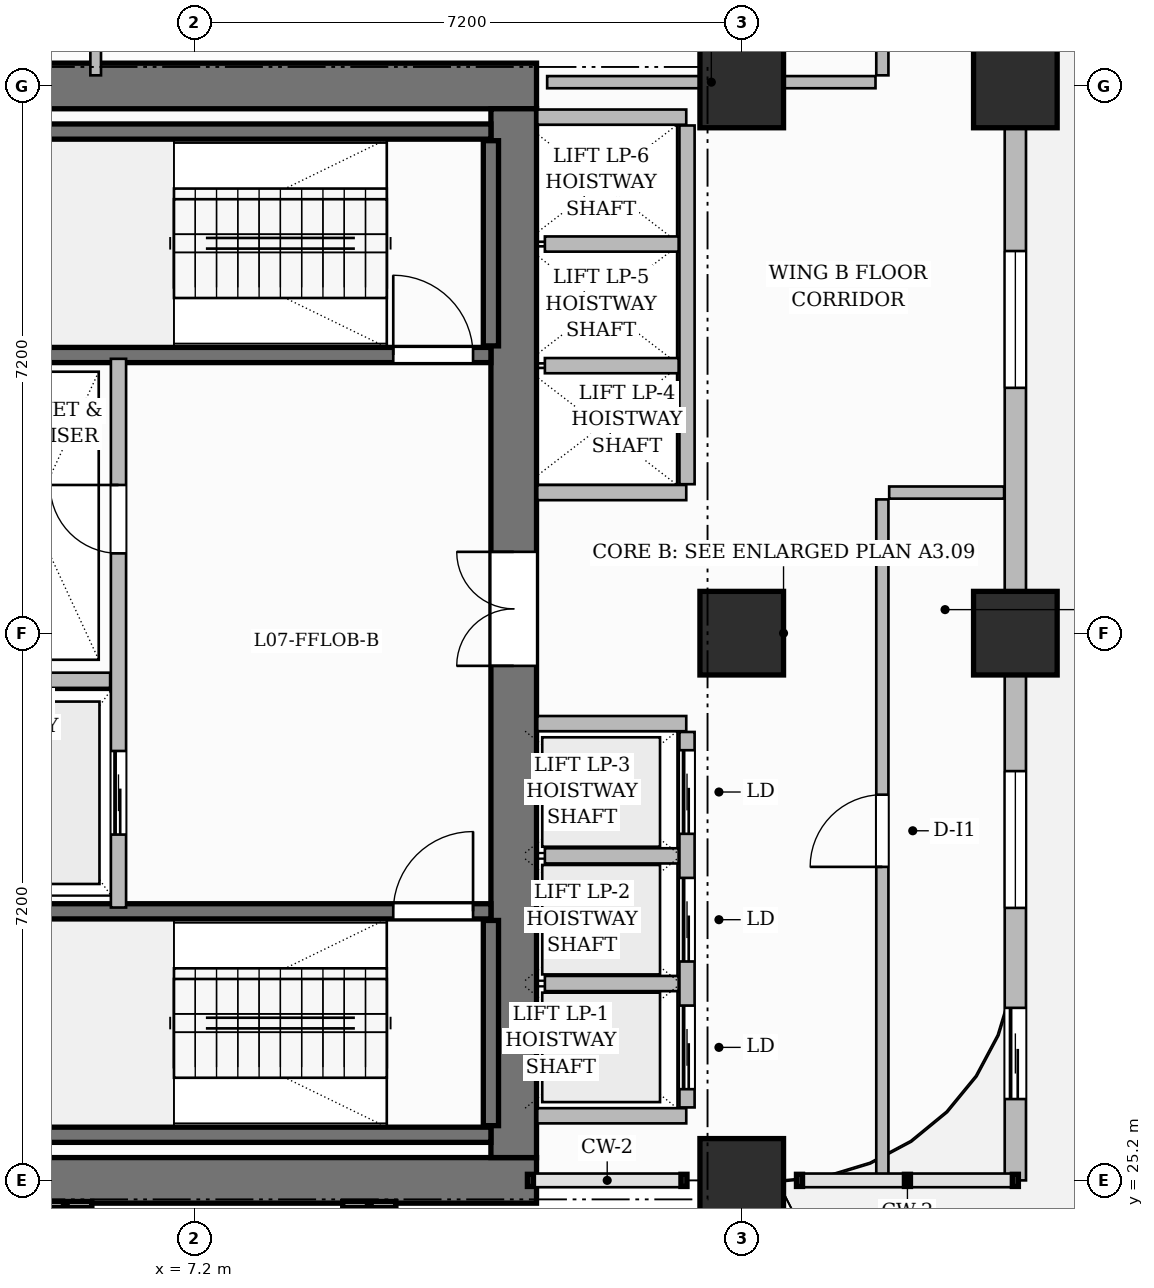
"""IFC4 building model, lengths in metres.
Left out: names, types, materials, properties, quantities, classifications, styles, units other than length and angle.
Written with IfcOpenShell. Run it as: python <this file> out.ifc"""

import sys

from ifc_helpers import new_model, si_unit, direction, frame, frame_2d, origin, origin_2d, place, context, subcontext, project, spatial, rectangle, extrude, source, transform, mapped, element, fill, save


model = new_model("IFC4")
c1 = context("Model", 3, precision=1e-05, world=origin(), true_north=direction((0.0, 1.0)))
c2 = subcontext(c1, "Body", "Model", "MODEL_VIEW")
j1 = project(units=[si_unit("LENGTHUNIT", "METRE"), si_unit("PLANEANGLEUNIT", "RADIAN")], contexts=[c1])
p1 = place(None, origin())
s1 = spatial("IfcSite", under=j1, at=p1, CompositionType="ELEMENT")
p2 = place(p1, origin())
s2 = spatial("IfcBuilding", under=s1, at=p2, CompositionType="ELEMENT")
p3 = place(p2, frame((0.0, 0.0, 36.1)))
s3 = spatial("IfcBuildingStorey", under=s2, at=p3, CompositionType="ELEMENT", Elevation=36.1)
for number, where, z_axis, x_axis in (
    (1, (3.3, 25.2, 0.0), (0.0, 0.0, 1.0), (1.0, 0.0, 0.0)),
    (2, (3.3, 39.6, 0.0), (0.0, 0.0, 1.0), (1.0, 0.0, 0.0)),
):
    element("IfcWall", number, at=place(p3, frame(where, z_axis=z_axis, x_axis=x_axis)), inside=s3, PredefinedType="SHEAR", context=c2, shape_type="SweptSolid", body=[
        extrude(rectangle(XDim=8.4, YDim=0.6, at=frame_2d((4.2, 0.0))), origin(), (0.0, 0.0, 1.0), 3.7),
    ])
p4 = place(p3, frame((11.4, 25.5, 0.0), z_axis=(0.0, 0.0, 1.0), x_axis=(0.0, 1.0, 0.0)))
e3 = element("IfcWall", 3, at=p4, inside=s3, PredefinedType="SHEAR", context=c2, shape_type="SweptSolid", body=[
    extrude(rectangle(XDim=13.8, YDim=0.6, at=frame_2d((6.9, 0.0))), origin(), (0.0, 0.0, 1.0), 3.7),
])
p5 = place(p4, frame((6.47, 0.0, 0.0)))
e4 = element("IfcOpeningElement", 4, at=p5, cuts=e3, PredefinedType="OPENING", context=c2, shape_type="SweptSolid", body=[
    extrude(rectangle(XDim=1.5, YDim=2.2, at=frame_2d((0.75, 1.1))), frame((0.0, 0.31, 0.0), z_axis=(0.0, -1.0, 0.0), x_axis=(1.0, 0.0, 0.0)), (0.0, 0.0, 1.0), 0.62),
])
m1 = source(origin(), c2, "Body", "SweptSolid", [
    extrude(rectangle(XDim=1.1, YDim=1.1, at=origin_2d()), origin(), (0.0, 0.0, 1.0), 3.7),
])
for number, where, z_axis, x_axis in (
    (5, (14.4, 25.2, 0.0), (0.0, 0.0, 1.0), (1.0, 0.0, 0.0)),
    (6, (14.4, 32.4, 0.0), (0.0, 0.0, 1.0), (1.0, 0.0, 0.0)),
    (7, (14.4, 39.6, 0.0), (0.0, 0.0, 1.0), (1.0, 0.0, 0.0)),
    (8, (18.0, 32.4, 0.0), (0.0, 0.0, 1.0), (1.0, 0.0, 0.0)),
    (9, (18.0, 39.6, 0.0), (0.0, 0.0, 1.0), (1.0, 0.0, 0.0)),
):
    element("IfcColumn", number, at=place(p3, frame(where, z_axis=z_axis, x_axis=x_axis)), inside=s3, PredefinedType="COLUMN", context=c2, shape_type="MappedRepresentation", body=[
        mapped(m1, transform((0.0, 0.0, 0.0), scale=1.0)),
    ])
p6 = place(p3, frame((4.0, 25.8, 0.0), z_axis=(0.0, 0.0, 1.0), x_axis=(1.0, 0.0, 0.0)))
e10 = element("IfcWall", 10, at=p6, inside=s3, PredefinedType="SHEAR", context=c2, shape_type="SweptSolid", body=[
    extrude(rectangle(XDim=7.1, YDim=0.2, at=frame_2d((3.55, 0.0))), origin(), (0.0, 0.0, 1.0), 3.7),
])
p7 = place(p3, frame((11.1, 25.92, 0.0), z_axis=(0.0, 0.0, 1.0), x_axis=(0.0, 1.0, 0.0)))
e11 = element("IfcWall", 11, at=p7, inside=s3, PredefinedType="SHEAR", context=c2, shape_type="SweptSolid", body=[
    extrude(rectangle(XDim=2.7, YDim=0.2, at=frame_2d((1.35, 0.0))), origin(), (0.0, 0.0, 1.0), 3.7),
])
p8 = place(p3, frame((4.0, 28.74, 0.0), z_axis=(0.0, 0.0, 1.0), x_axis=(1.0, 0.0, 0.0)))
e12 = element("IfcWall", 12, at=p8, inside=s3, PredefinedType="SHEAR", context=c2, shape_type="SweptSolid", body=[
    extrude(rectangle(XDim=7.1, YDim=0.2, at=frame_2d((3.55, 0.0))), origin(), (0.0, 0.0, 1.0), 3.7),
])
p9 = place(p8, frame((5.815, 0.0, 0.0)))
e13 = element("IfcOpeningElement", 13, at=p9, cuts=e12, PredefinedType="OPENING", context=c2, shape_type="SweptSolid", body=[
    extrude(rectangle(XDim=1.05, YDim=2.2, at=frame_2d((0.525, 1.1))), frame((0.0, 0.11, 0.0), z_axis=(0.0, -1.0, 0.0), x_axis=(1.0, 0.0, 0.0)), (0.0, 0.0, 1.0), 0.22),
])
p10 = place(p3, frame((4.0, 39.0, 0.0), z_axis=(0.0, 0.0, 1.0), x_axis=(1.0, 0.0, 0.0)))
e14 = element("IfcWall", 14, at=p10, inside=s3, PredefinedType="SHEAR", context=c2, shape_type="SweptSolid", body=[
    extrude(rectangle(XDim=7.1, YDim=0.2, at=frame_2d((3.55, 0.0))), origin(), (0.0, 0.0, 1.0), 3.7),
])
p11 = place(p3, frame((11.1, 36.18, 0.0), z_axis=(0.0, 0.0, 1.0), x_axis=(0.0, 1.0, 0.0)))
e15 = element("IfcWall", 15, at=p11, inside=s3, PredefinedType="SHEAR", context=c2, shape_type="SweptSolid", body=[
    extrude(rectangle(XDim=2.7, YDim=0.2, at=frame_2d((1.35, 0.0))), origin(), (0.0, 0.0, 1.0), 3.7),
])
p12 = place(p3, frame((4.0, 36.06, 0.0), z_axis=(0.0, 0.0, 1.0), x_axis=(1.0, 0.0, 0.0)))
e16 = element("IfcWall", 16, at=p12, inside=s3, PredefinedType="SHEAR", context=c2, shape_type="SweptSolid", body=[
    extrude(rectangle(XDim=7.1, YDim=0.2, at=frame_2d((3.55, 0.0))), origin(), (0.0, 0.0, 1.0), 3.7),
])
p13 = place(p12, frame((5.815, 0.0, 0.0)))
e17 = element("IfcOpeningElement", 17, at=p13, cuts=e16, PredefinedType="OPENING", context=c2, shape_type="SweptSolid", body=[
    extrude(rectangle(XDim=1.05, YDim=2.2, at=frame_2d((0.525, 1.1))), frame((0.0, 0.11, 0.0), z_axis=(0.0, -1.0, 0.0), x_axis=(1.0, 0.0, 0.0)), (0.0, 0.0, 1.0), 0.22),
])
p14 = place(p3, frame((6.2, 28.79, 0.0), z_axis=(0.0, 0.0, 1.0), x_axis=(0.0, 1.0, 0.0)))
e18 = element("IfcWall", 18, at=p14, inside=s3, PredefinedType="PARTITIONING", context=c2, shape_type="SweptSolid", body=[
    extrude(rectangle(XDim=7.22, YDim=0.2, at=frame_2d((3.61, 0.0))), origin(), (0.0, 0.0, 1.0), 3.45),
])
p15 = place(p14, frame((4.66, 0.0, 0.0)))
e19 = element("IfcOpeningElement", 19, at=p15, cuts=e18, PredefinedType="OPENING", context=c2, shape_type="SweptSolid", body=[
    extrude(rectangle(XDim=0.9, YDim=2.1, at=frame_2d((0.45, 1.05))), frame((0.0, 0.11, 0.0), z_axis=(0.0, -1.0, 0.0), x_axis=(1.0, 0.0, 0.0)), (0.0, 0.0, 1.0), 0.22),
])
p16 = place(p14, frame((0.96, 0.0, 0.0)))
e20 = element("IfcOpeningElement", 20, at=p16, cuts=e18, PredefinedType="OPENING", context=c2, shape_type="SweptSolid", body=[
    extrude(rectangle(XDim=1.1, YDim=2.2, at=frame_2d((0.55, 1.1))), frame((0.0, 0.11, 0.0), z_axis=(0.0, -1.0, 0.0), x_axis=(1.0, 0.0, 0.0)), (0.0, 0.0, 1.0), 0.22),
])
p17 = place(p3, frame((3.96, 31.78, 0.0), z_axis=(0.0, 0.0, 1.0), x_axis=(1.0, 0.0, 0.0)))
e21 = element("IfcWall", 21, at=p17, inside=s3, PredefinedType="PARTITIONING", context=c2, shape_type="SweptSolid", body=[
    extrude(rectangle(XDim=2.13, YDim=0.2, at=frame_2d((1.065, 0.0))), origin(), (0.0, 0.0, 1.0), 3.45),
])
for number, where, z_axis, x_axis in (
    (22, (11.71, 26.05, 0.0), (0.0, 0.0, 1.0), (1.0, 0.0, 0.0)),
    (23, (11.71, 31.21, 0.0), (0.0, 0.0, 1.0), (1.0, 0.0, 0.0)),
):
    element("IfcWall", number, at=place(p3, frame(where, z_axis=z_axis, x_axis=x_axis)), inside=s3, PredefinedType="PARTITIONING", context=c2, shape_type="SweptSolid", body=[
        extrude(rectangle(XDim=1.96, YDim=0.2, at=frame_2d((0.98, 0.0))), origin(), (0.0, 0.0, 1.0), 3.45),
    ])
p18 = place(p3, frame((13.68, 26.16, 0.0), z_axis=(0.0, 0.0, 1.0), x_axis=(0.0, 1.0, 0.0)))
e24 = element("IfcWall", 24, at=p18, inside=s3, PredefinedType="PARTITIONING", context=c2, shape_type="SweptSolid", body=[
    extrude(rectangle(XDim=4.94, YDim=0.2, at=frame_2d((2.47, 0.0))), origin(), (0.0, 0.0, 1.0), 3.45),
])
p19 = place(p18, frame((0.24, 0.0, 0.0)))
e25 = element("IfcOpeningElement", 25, at=p19, cuts=e24, PredefinedType="OPENING", context=c2, shape_type="SweptSolid", body=[
    extrude(rectangle(XDim=1.1, YDim=2.2, at=frame_2d((0.55, 1.1))), frame((0.0, 0.11, 0.0), z_axis=(0.0, -1.0, 0.0), x_axis=(1.0, 0.0, 0.0)), (0.0, 0.0, 1.0), 0.22),
])
p20 = place(p18, frame((1.92, 0.0, 0.0)))
e26 = element("IfcOpeningElement", 26, at=p20, cuts=e24, PredefinedType="OPENING", context=c2, shape_type="SweptSolid", body=[
    extrude(rectangle(XDim=1.1, YDim=2.2, at=frame_2d((0.55, 1.1))), frame((0.0, 0.11, 0.0), z_axis=(0.0, -1.0, 0.0), x_axis=(1.0, 0.0, 0.0)), (0.0, 0.0, 1.0), 0.22),
])
p21 = place(p18, frame((3.6, 0.0, 0.0)))
e27 = element("IfcOpeningElement", 27, at=p21, cuts=e24, PredefinedType="OPENING", context=c2, shape_type="SweptSolid", body=[
    extrude(rectangle(XDim=1.1, YDim=2.2, at=frame_2d((0.55, 1.1))), frame((0.0, 0.11, 0.0), z_axis=(0.0, -1.0, 0.0), x_axis=(1.0, 0.0, 0.0)), (0.0, 0.0, 1.0), 0.22),
])
for number, where, z_axis, x_axis in (
    (28, (11.81, 27.79, 0.0), (0.0, 0.0, 1.0), (1.0, 0.0, 0.0)),
    (29, (11.81, 29.47, 0.0), (0.0, 0.0, 1.0), (1.0, 0.0, 0.0)),
):
    element("IfcWall", number, at=place(p3, frame(where, z_axis=z_axis, x_axis=x_axis)), inside=s3, PredefinedType="PARTITIONING", context=c2, shape_type="SweptSolid", body=[
        extrude(rectangle(XDim=1.76, YDim=0.2, at=frame_2d((0.88, 0.0))), origin(), (0.0, 0.0, 1.0), 3.45),
    ])
for number, where, z_axis, x_axis in (
    (30, (11.71, 34.25, 0.0), (0.0, 0.0, 1.0), (1.0, 0.0, 0.0)),
    (31, (11.71, 39.19, 0.0), (0.0, 0.0, 1.0), (1.0, 0.0, 0.0)),
):
    element("IfcWall", number, at=place(p3, frame(where, z_axis=z_axis, x_axis=x_axis)), inside=s3, PredefinedType="PARTITIONING", context=c2, shape_type="SweptSolid", body=[
        extrude(rectangle(XDim=1.96, YDim=0.2, at=frame_2d((0.98, 0.0))), origin(), (0.0, 0.0, 1.0), 3.45),
    ])
p22 = place(p3, frame((13.68, 34.36, 0.0), z_axis=(0.0, 0.0, 1.0), x_axis=(0.0, 1.0, 0.0)))
e32 = element("IfcWall", 32, at=p22, inside=s3, PredefinedType="PARTITIONING", context=c2, shape_type="SweptSolid", body=[
    extrude(rectangle(XDim=4.72, YDim=0.2, at=frame_2d((2.36, 0.0))), origin(), (0.0, 0.0, 1.0), 3.45),
])
for number, where, z_axis, x_axis in (
    (33, (11.81, 35.92, 0.0), (0.0, 0.0, 1.0), (1.0, 0.0, 0.0)),
    (34, (11.81, 37.52, 0.0), (0.0, 0.0, 1.0), (1.0, 0.0, 0.0)),
):
    element("IfcWall", number, at=place(p3, frame(where, z_axis=z_axis, x_axis=x_axis)), inside=s3, PredefinedType="PARTITIONING", context=c2, shape_type="SweptSolid", body=[
        extrude(rectangle(XDim=1.76, YDim=0.2, at=frame_2d((0.88, 0.0))), origin(), (0.0, 0.0, 1.0), 3.45),
    ])
p23 = place(p3, frame((16.25, 25.228, 0.0), z_axis=(0.0, 0.0, 1.0), x_axis=(0.0, 1.0, 0.0)))
e35 = element("IfcWall", 35, at=p23, inside=s3, PredefinedType="PARTITIONING", context=c2, shape_type="SweptSolid", body=[
    extrude(rectangle(XDim=8.932, YDim=0.16, at=frame_2d((4.466, 0.0))), origin(), (0.0, 0.0, 1.0), 3.45),
])
p24 = place(p23, frame((4.097, 0.0, 0.0)))
e36 = element("IfcOpeningElement", 36, at=p24, cuts=e35, PredefinedType="OPENING", context=c2, shape_type="SweptSolid", body=[
    extrude(rectangle(XDim=0.95, YDim=2.15, at=frame_2d((0.475, 1.075))), frame((0.0, 0.09, 0.0), z_axis=(0.0, -1.0, 0.0), x_axis=(1.0, 0.0, 0.0)), (0.0, 0.0, 1.0), 0.18),
])
p25 = place(p3, frame((16.34, 34.25, 0.0), z_axis=(0.0, 0.0, 1.0), x_axis=(1.0, 0.0, 0.0)))
e37 = element("IfcWall", 37, at=p25, inside=s3, PredefinedType="PARTITIONING", context=c2, shape_type="SweptSolid", body=[
    extrude(rectangle(XDim=1.512, YDim=0.16, at=frame_2d((0.756, 0.0))), origin(), (0.0, 0.0, 1.0), 3.45),
])
p26 = place(p3, frame((16.25, 39.74, 0.0), z_axis=(0.0, 0.0, 1.0), x_axis=(0.0, 1.0, 0.0)))
e38 = element("IfcWall", 38, at=p26, inside=s3, PredefinedType="PARTITIONING", context=c2, shape_type="SweptSolid", body=[
    extrude(rectangle(XDim=6.912, YDim=0.16, at=frame_2d((3.456, 0.0))), origin(), (0.0, 0.0, 1.0), 3.45),
])
p27 = place(p26, frame((1.035, 0.0, 0.0)))
e39 = element("IfcOpeningElement", 39, at=p27, cuts=e38, PredefinedType="OPENING", context=c2, shape_type="SweptSolid", body=[
    extrude(rectangle(XDim=1.0, YDim=2.2, at=frame_2d((0.5, 1.1))), frame((0.0, 0.09, 0.0), z_axis=(0.0, -1.0, 0.0), x_axis=(1.0, 0.0, 0.0)), (0.0, 0.0, 1.0), 0.18),
])
p28 = place(p26, frame((4.51, 0.0, 0.0)))
e40 = element("IfcOpeningElement", 40, at=p28, cuts=e38, PredefinedType="OPENING", context=c2, shape_type="SweptSolid", body=[
    extrude(rectangle(XDim=1.05, YDim=2.25, at=frame_2d((0.525, 1.125))), frame((0.0, 0.09, 0.0), z_axis=(0.0, -1.0, 0.0), x_axis=(1.0, 0.0, 0.0)), (0.0, 0.0, 1.0), 0.18),
])
p29 = place(p3, frame((11.84, 39.65, 0.0), z_axis=(0.0, 0.0, 1.0), x_axis=(1.0, 0.0, 0.0)))
e41 = element("IfcWall", 41, at=p29, inside=s3, PredefinedType="PARTITIONING", context=c2, shape_type="SweptSolid", body=[
    extrude(rectangle(XDim=4.32, YDim=0.16, at=frame_2d((2.16, 0.0))), origin(), (0.0, 0.0, 1.0), 2.885),
])
p30 = place(p3, frame((5.9, 39.74, 0.0), z_axis=(0.0, 0.0, 1.0), x_axis=(0.0, 1.0, 0.0)))
e42 = element("IfcWall", 42, at=p30, inside=s3, PredefinedType="PARTITIONING", context=c2, shape_type="SweptSolid", body=[
    extrude(rectangle(XDim=1.67, YDim=0.14, at=frame_2d((0.835, 0.0))), origin(), (0.0, 0.0, 1.0), 3.45),
])
p31 = place(p30, frame((0.41, 0.0, 0.0)))
e43 = element("IfcOpeningElement", 43, at=p31, cuts=e42, PredefinedType="OPENING", context=c2, shape_type="SweptSolid", body=[
    extrude(rectangle(XDim=0.85, YDim=2.1, at=frame_2d((0.425, 1.05))), frame((0.0, 0.08, 0.0), z_axis=(0.0, -1.0, 0.0), x_axis=(1.0, 0.0, 0.0)), (0.0, 0.0, 1.0), 0.16),
])
p32 = place(p3, frame((18.0, 25.2, 0.0), z_axis=(0.0, 0.0, 1.0), x_axis=(0.0, 1.0, 0.0)))
e44 = element("IfcWall", 44, at=p32, inside=s3, PredefinedType="SOLIDWALL", context=c2, shape_type="SweptSolid", body=[
    extrude(rectangle(XDim=21.55, YDim=0.28, at=frame_2d((10.775, 0.0))), origin(), (0.0, 0.0, 1.0), 3.45),
])
p33 = place(p32, frame((18.5, 0.0, 0.0)))
e45 = element("IfcOpeningElement", 45, at=p33, cuts=e44, PredefinedType="OPENING", context=c2, shape_type="SweptSolid", body=[
    extrude(rectangle(XDim=1.2, YDim=2.2, at=frame_2d((0.6, 1.1))), frame((0.0, 0.15, 0.0), z_axis=(0.0, -1.0, 0.0), x_axis=(1.0, 0.0, 0.0)), (0.0, 0.0, 1.0), 0.3),
])
p34 = place(p32, frame((1.07, 0.0, 0.0)))
e46 = element("IfcOpeningElement", 46, at=p34, cuts=e44, PredefinedType="OPENING", context=c2, shape_type="SweptSolid", body=[
    extrude(rectangle(XDim=1.2, YDim=2.2, at=frame_2d((0.6, 1.1))), frame((0.0, 0.15, 0.0), z_axis=(0.0, -1.0, 0.0), x_axis=(1.0, 0.0, 0.0)), (0.0, 0.0, 1.0), 0.3),
])
p35 = place(p32, frame((3.585, 0.0, 0.8)))
e47 = element("IfcOpeningElement", 47, at=p35, cuts=e44, PredefinedType="OPENING", context=c2, shape_type="SweptSolid", body=[
    extrude(rectangle(XDim=1.8, YDim=1.85, at=frame_2d((0.9, 0.925))), frame((0.0, 0.15, 0.0), z_axis=(0.0, -1.0, 0.0), x_axis=(1.0, 0.0, 0.0)), (0.0, 0.0, 1.0), 0.3),
])
p36 = place(p32, frame((10.428, 0.0, 0.8)))
e48 = element("IfcOpeningElement", 48, at=p36, cuts=e44, PredefinedType="OPENING", context=c2, shape_type="SweptSolid", body=[
    extrude(rectangle(XDim=1.8, YDim=1.85, at=frame_2d((0.9, 0.925))), frame((0.0, 0.15, 0.0), z_axis=(0.0, -1.0, 0.0), x_axis=(1.0, 0.0, 0.0)), (0.0, 0.0, 1.0), 0.3),
])
p37 = place(p32, frame((15.8, 0.0, 0.8)))
e49 = element("IfcOpeningElement", 49, at=p37, cuts=e44, PredefinedType="OPENING", context=c2, shape_type="SweptSolid", body=[
    extrude(rectangle(XDim=1.8, YDim=1.85, at=frame_2d((0.9, 0.925))), frame((0.0, 0.15, 0.0), z_axis=(0.0, -1.0, 0.0), x_axis=(1.0, 0.0, 0.0)), (0.0, 0.0, 1.0), 0.3),
])
m2 = source(origin(), c2, "Body", "SweptSolid", [
    extrude(rectangle(XDim=1.05, YDim=2.2, at=frame_2d((0.525, 1.1))), frame((0.0, 0.025, 0.0), z_axis=(0.0, -1.0, 0.0), x_axis=(1.0, 0.0, 0.0)), (0.0, 0.0, 1.0), 0.05),
])
p38 = place(p9, origin())
e50 = element("IfcDoor", 50, at=p38, inside=s3, OperationType="SINGLE_SWING_RIGHT", PredefinedType="DOOR", context=c2, shape_type="MappedRepresentation", body=[
    mapped(m2, transform((0.0, 0.0, 0.0), scale=1.0)),
])
fill(e13, e50)
p39 = place(p13, origin())
e51 = element("IfcDoor", 51, at=p39, inside=s3, OperationType="SINGLE_SWING_LEFT", PredefinedType="DOOR", context=c2, shape_type="MappedRepresentation", body=[
    mapped(m2, transform((0.0, 0.0, 0.0), scale=1.0)),
])
fill(e17, e51)
m3 = source(origin(), c2, "Body", "SweptSolid", [
    extrude(rectangle(XDim=0.9, YDim=2.1, at=frame_2d((0.45, 1.05))), frame((0.0, 0.025, 0.0), z_axis=(0.0, -1.0, 0.0), x_axis=(1.0, 0.0, 0.0)), (0.0, 0.0, 1.0), 0.05),
])
p40 = place(p15, origin())
e52 = element("IfcDoor", 52, at=p40, inside=s3, OperationType="SINGLE_SWING_RIGHT", PredefinedType="DOOR", context=c2, shape_type="MappedRepresentation", body=[
    mapped(m3, transform((0.0, 0.0, 0.0), scale=1.0)),
])
fill(e19, e52)
m4 = source(origin(), c2, "Body", "SweptSolid", [
    extrude(rectangle(XDim=1.5, YDim=2.2, at=frame_2d((0.75, 1.1))), frame((0.0, 0.025, 0.0), z_axis=(0.0, -1.0, 0.0), x_axis=(1.0, 0.0, 0.0)), (0.0, 0.0, 1.0), 0.05),
])
p41 = place(p5, origin())
e53 = element("IfcDoor", 53, at=p41, inside=s3, OperationType="DOUBLE_DOOR_SINGLE_SWING", PredefinedType="DOOR", context=c2, shape_type="MappedRepresentation", body=[
    mapped(m4, transform((0.0, 0.0, 0.0), scale=1.0)),
])
fill(e4, e53)
m5 = source(origin(), c2, "Body", "SweptSolid", [
    extrude(rectangle(XDim=0.95, YDim=2.15, at=frame_2d((0.475, 1.075))), frame((0.0, 0.025, 0.0), z_axis=(0.0, -1.0, 0.0), x_axis=(1.0, 0.0, 0.0)), (0.0, 0.0, 1.0), 0.05),
])
p42 = place(p24, origin())
e54 = element("IfcDoor", 54, at=p42, inside=s3, OperationType="SINGLE_SWING_LEFT", PredefinedType="DOOR", context=c2, shape_type="MappedRepresentation", body=[
    mapped(m5, transform((0.0, 0.0, 0.0), scale=1.0)),
])
fill(e36, e54)
m6 = source(origin(), c2, "Body", "SweptSolid", [
    extrude(rectangle(XDim=1.1, YDim=2.2, at=frame_2d((0.55, 1.1))), frame((0.0, 0.025, 0.0), z_axis=(0.0, -1.0, 0.0), x_axis=(1.0, 0.0, 0.0)), (0.0, 0.0, 1.0), 0.05),
])
p43 = place(p16, origin())
e55 = element("IfcDoor", 55, at=p43, inside=s3, OperationType="SLIDING_TO_LEFT", PredefinedType="DOOR", context=c2, shape_type="MappedRepresentation", body=[
    mapped(m6, transform((0.0, 0.0, 0.0), scale=1.0)),
])
fill(e20, e55)
p44 = place(p19, origin())
e56 = element("IfcDoor", 56, at=p44, inside=s3, OperationType="SLIDING_TO_LEFT", PredefinedType="DOOR", context=c2, shape_type="MappedRepresentation", body=[
    mapped(m6, transform((0.0, 0.0, 0.0), scale=1.0)),
])
fill(e25, e56)
p45 = place(p20, origin())
e57 = element("IfcDoor", 57, at=p45, inside=s3, OperationType="SLIDING_TO_LEFT", PredefinedType="DOOR", context=c2, shape_type="MappedRepresentation", body=[
    mapped(m6, transform((0.0, 0.0, 0.0), scale=1.0)),
])
fill(e26, e57)
p46 = place(p21, origin())
e58 = element("IfcDoor", 58, at=p46, inside=s3, OperationType="SLIDING_TO_LEFT", PredefinedType="DOOR", context=c2, shape_type="MappedRepresentation", body=[
    mapped(m6, transform((0.0, 0.0, 0.0), scale=1.0)),
])
fill(e27, e58)
m7 = source(origin(), c2, "Body", "SweptSolid", [
    extrude(rectangle(XDim=1.2, YDim=2.2, at=frame_2d((0.6, 1.1))), frame((0.0, 0.025, 0.0), z_axis=(0.0, -1.0, 0.0), x_axis=(1.0, 0.0, 0.0)), (0.0, 0.0, 1.0), 0.05),
])
p47 = place(p34, origin())
e59 = element("IfcDoor", 59, at=p47, inside=s3, OperationType="SLIDING_TO_LEFT", PredefinedType="DOOR", context=c2, shape_type="MappedRepresentation", body=[
    mapped(m7, transform((0.0, 0.0, 0.0), scale=1.0)),
])
fill(e46, e59)
m8 = source(origin(), c2, "Body", "SweptSolid", [
    extrude(rectangle(XDim=1.8, YDim=1.85, at=frame_2d((0.9, 0.925))), frame((0.0, 0.03, 0.0), z_axis=(0.0, -1.0, 0.0), x_axis=(1.0, 0.0, 0.0)), (0.0, 0.0, 1.0), 0.06),
])
p48 = place(p35, origin())
e60 = element("IfcWindow", 60, at=p48, inside=s3, PartitioningType="DOUBLE_PANEL_VERTICAL", PredefinedType="WINDOW", context=c2, shape_type="MappedRepresentation", body=[
    mapped(m8, transform((0.0, 0.0, 0.0), scale=1.0)),
])
fill(e47, e60)
p49 = place(p36, origin())
e61 = element("IfcWindow", 61, at=p49, inside=s3, PartitioningType="DOUBLE_PANEL_VERTICAL", PredefinedType="WINDOW", context=c2, shape_type="MappedRepresentation", body=[
    mapped(m8, transform((0.0, 0.0, 0.0), scale=1.0)),
])
fill(e48, e61)
save(model, sys.argv[1])
